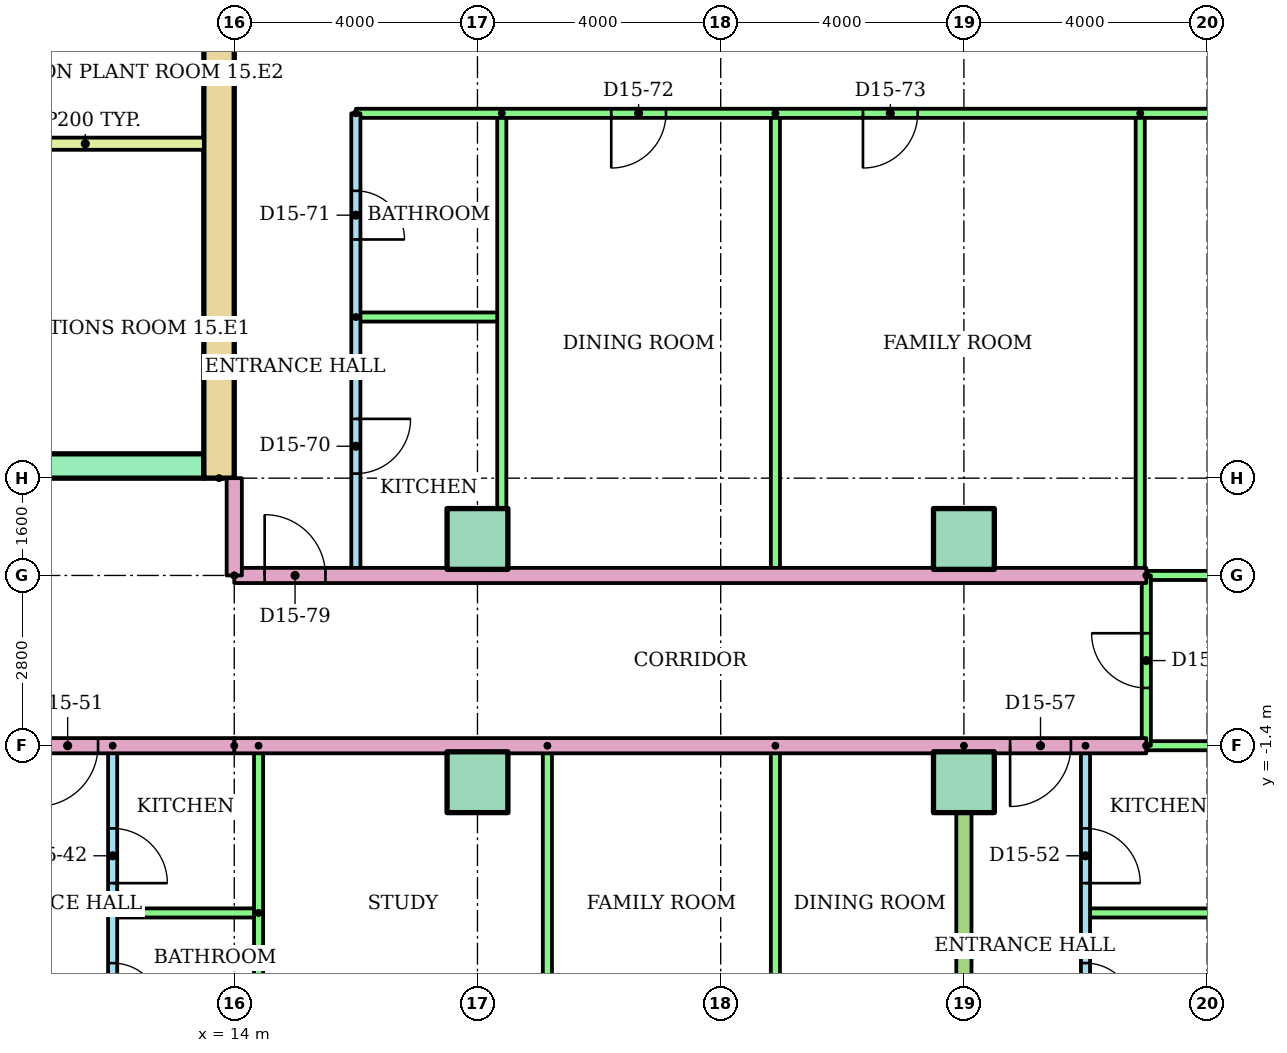
"""IFC4 building model, lengths in metres.
Left out: names, types, materials, properties, quantities, classifications, styles, units other than length and angle.
Written with IfcOpenShell. Run it as: python <this file> out.ifc"""

import sys

from ifc_helpers import new_model, si_unit, direction, frame, frame_2d, origin, origin_2d, place, context, subcontext, project, spatial, rectangle, extrude, element, fill, save


model = new_model("IFC4")
c1 = context("Model", 3, precision=1e-05, world=origin(), true_north=direction((0.0, 1.0)))
c2 = subcontext(c1, "Body", "Model", "MODEL_VIEW")
j1 = project(units=[si_unit("LENGTHUNIT", "METRE"), si_unit("PLANEANGLEUNIT", "RADIAN")], contexts=[c1])
p1 = place(None, origin())
s1 = spatial("IfcSite", under=j1, at=p1, CompositionType="ELEMENT")
p2 = place(p1, origin())
s2 = spatial("IfcBuilding", under=s1, at=p2, CompositionType="ELEMENT")
p3 = place(p2, frame((0.0, 0.0, 57.6)))
s3 = spatial("IfcBuildingStorey", under=s2, at=p3, CompositionType="ELEMENT", Elevation=57.6)
for number, where in (
    (1, (18.0, -2.0, 0.0)),
    (2, (26.0, -2.0, 0.0)),
    (3, (18.0, 2.0, 0.0)),
    (4, (26.0, 2.0, 0.0)),
):
    element("IfcColumn", number, at=place(p3, frame(where)), inside=s3, PredefinedType="COLUMN", context=c2, shape_type="SweptSolid", body=[
        extrude(rectangle(XDim=1.0, YDim=1.0, at=origin_2d()), origin(), (0.0, 0.0, 1.0), 3.2),
    ])
p4 = place(p3, frame((13.75, 3.0, 0.0), z_axis=(0.0, 0.0, 1.0), x_axis=(0.0, 1.0, 0.0)))
e5 = element("IfcWall", 5, at=p4, inside=s3, PredefinedType="SHEAR", context=c2, shape_type="SweptSolid", body=[
    extrude(rectangle(XDim=17.0, YDim=0.5, at=frame_2d((8.5, 0.0))), origin(), (0.0, 0.0, 1.0), 2.92),
])
p5 = place(p3, frame((-13.5, 3.2, 0.0)))
e6 = element("IfcWall", 6, at=p5, inside=s3, PredefinedType="SHEAR", context=c2, shape_type="SweptSolid", body=[
    extrude(rectangle(XDim=27.0, YDim=0.4, at=frame_2d((13.5, 0.0))), origin(), (0.0, 0.0, 1.0), 2.92),
])
p6 = place(p5, frame((6.861, 0.0, 0.0)))
e7 = element("IfcOpeningElement", 7, at=p6, cuts=e6, PredefinedType="OPENING", context=c2, shape_type="SweptSolid", body=[
    extrude(rectangle(XDim=1.1, YDim=2.1, at=frame_2d((0.55, 1.05))), frame((0.0, 0.21, 0.0), z_axis=(0.0, -1.0, 0.0), x_axis=(1.0, 0.0, 0.0)), (0.0, 0.0, 1.0), 0.42),
])
p7 = place(p5, frame((9.906, 0.0, 0.0)))
e8 = element("IfcOpeningElement", 8, at=p7, cuts=e6, PredefinedType="OPENING", context=c2, shape_type="SweptSolid", body=[
    extrude(rectangle(XDim=1.1, YDim=2.1, at=frame_2d((0.55, 1.05))), frame((0.0, 0.21, 0.0), z_axis=(0.0, -1.0, 0.0), x_axis=(1.0, 0.0, 0.0)), (0.0, 0.0, 1.0), 0.42),
])
p8 = place(p5, frame((15.994, 0.0, 0.0)))
e9 = element("IfcOpeningElement", 9, at=p8, cuts=e6, PredefinedType="OPENING", context=c2, shape_type="SweptSolid", body=[
    extrude(rectangle(XDim=1.1, YDim=2.1, at=frame_2d((0.55, 1.05))), frame((0.0, 0.21, 0.0), z_axis=(0.0, -1.0, 0.0), x_axis=(1.0, 0.0, 0.0)), (0.0, 0.0, 1.0), 0.42),
])
p9 = place(p5, frame((19.039, 0.0, 0.0)))
e10 = element("IfcOpeningElement", 10, at=p9, cuts=e6, PredefinedType="OPENING", context=c2, shape_type="SweptSolid", body=[
    extrude(rectangle(XDim=1.1, YDim=2.1, at=frame_2d((0.55, 1.05))), frame((0.0, 0.21, 0.0), z_axis=(0.0, -1.0, 0.0), x_axis=(1.0, 0.0, 0.0)), (0.0, 0.0, 1.0), 0.42),
])
p10 = place(p5, frame((12.6, 0.0, 0.0)))
e11 = element("IfcOpeningElement", 11, at=p10, cuts=e6, PredefinedType="OPENING", context=c2, shape_type="SweptSolid", body=[
    extrude(rectangle(XDim=1.8, YDim=2.1, at=frame_2d((0.9, 1.05))), frame((0.0, 0.21, 0.0), z_axis=(0.0, -1.0, 0.0), x_axis=(1.0, 0.0, 0.0)), (0.0, 0.0, 1.0), 0.42),
])
p11 = place(p3, frame((9.6, 8.5, 0.0)))
e12 = element("IfcWall", 12, at=p11, inside=s3, PredefinedType="PARTITIONING", context=c2, shape_type="SweptSolid", body=[
    extrude(rectangle(XDim=3.9, YDim=0.2, at=frame_2d((1.95, 0.0))), origin(), (0.0, 0.0, 1.0), 2.92),
])
p12 = place(p3, frame((12.0, -1.4, 0.0), z_axis=(0.0, 0.0, 1.0), x_axis=(0.0, -1.0, 0.0)))
e13 = element("IfcWall", 13, at=p12, inside=s3, PredefinedType="PARTITIONING", context=c2, shape_type="SweptSolid", body=[
    extrude(rectangle(XDim=5.2, YDim=0.15, at=frame_2d((2.6, 0.0))), origin(), (0.0, 0.0, 1.0), 2.4),
])
p13 = place(p12, frame((1.36, 0.0, 0.0)))
e14 = element("IfcOpeningElement", 14, at=p13, cuts=e13, PredefinedType="OPENING", context=c2, shape_type="SweptSolid", body=[
    extrude(rectangle(XDim=0.9, YDim=2.1, at=frame_2d((0.45, 1.05))), frame((0.0, 0.085, 0.0), z_axis=(0.0, -1.0, 0.0), x_axis=(1.0, 0.0, 0.0)), (0.0, 0.0, 1.0), 0.17),
])
p14 = place(p12, frame((3.575, 0.0, 0.0)))
e15 = element("IfcOpeningElement", 15, at=p14, cuts=e13, PredefinedType="OPENING", context=c2, shape_type="SweptSolid", body=[
    extrude(rectangle(XDim=0.8, YDim=2.1, at=frame_2d((0.4, 1.05))), frame((0.0, 0.085, 0.0), z_axis=(0.0, -1.0, 0.0), x_axis=(1.0, 0.0, 0.0)), (0.0, 0.0, 1.0), 0.17),
])
p15 = place(p3, frame((14.4, -4.15, 0.0), z_axis=(0.0, 0.0, 1.0), x_axis=(-1.0, 0.0, 0.0)))
e16 = element("IfcWall", 16, at=p15, inside=s3, PredefinedType="PARTITIONING", context=c2, shape_type="SweptSolid", body=[
    extrude(rectangle(XDim=2.4, YDim=0.15, at=frame_2d((1.2, 0.0))), origin(), (0.0, 0.0, 1.0), 2.4),
])
for number, where, z_axis, x_axis in (
    (17, (14.4, -1.4, 0.0), (0.0, 0.0, 1.0), (0.0, -1.0, 0.0)),
    (18, (19.15, -1.4, 0.0), (0.0, 0.0, 1.0), (0.0, -1.0, 0.0)),
    (19, (22.9, -1.4, 0.0), (0.0, 0.0, 1.0), (0.0, -1.0, 0.0)),
):
    element("IfcWall", number, at=place(p3, frame(where, z_axis=z_axis, x_axis=x_axis)), inside=s3, PredefinedType="PARTITIONING", context=c2, shape_type="SweptSolid", body=[
        extrude(rectangle(XDim=5.2, YDim=0.15, at=frame_2d((2.6, 0.0))), origin(), (0.0, 0.0, 1.0), 2.4),
    ])
p16 = place(p3, frame((28.0, -1.4, 0.0), z_axis=(0.0, 0.0, 1.0), x_axis=(0.0, -1.0, 0.0)))
e20 = element("IfcWall", 20, at=p16, inside=s3, PredefinedType="PARTITIONING", context=c2, shape_type="SweptSolid", body=[
    extrude(rectangle(XDim=5.2, YDim=0.15, at=frame_2d((2.6, 0.0))), origin(), (0.0, 0.0, 1.0), 2.4),
])
p17 = place(p16, frame((1.36, 0.0, 0.0)))
e21 = element("IfcOpeningElement", 21, at=p17, cuts=e20, PredefinedType="OPENING", context=c2, shape_type="SweptSolid", body=[
    extrude(rectangle(XDim=0.9, YDim=2.1, at=frame_2d((0.45, 1.05))), frame((0.0, 0.085, 0.0), z_axis=(0.0, -1.0, 0.0), x_axis=(1.0, 0.0, 0.0)), (0.0, 0.0, 1.0), 0.17),
])
p18 = place(p16, frame((3.575, 0.0, 0.0)))
e22 = element("IfcOpeningElement", 22, at=p18, cuts=e20, PredefinedType="OPENING", context=c2, shape_type="SweptSolid", body=[
    extrude(rectangle(XDim=0.8, YDim=2.1, at=frame_2d((0.4, 1.05))), frame((0.0, 0.085, 0.0), z_axis=(0.0, -1.0, 0.0), x_axis=(1.0, 0.0, 0.0)), (0.0, 0.0, 1.0), 0.17),
])
p19 = place(p3, frame((30.4, -4.15, 0.0), z_axis=(0.0, 0.0, 1.0), x_axis=(-1.0, 0.0, 0.0)))
e23 = element("IfcWall", 23, at=p19, inside=s3, PredefinedType="PARTITIONING", context=c2, shape_type="SweptSolid", body=[
    extrude(rectangle(XDim=2.4, YDim=0.15, at=frame_2d((1.2, 0.0))), origin(), (0.0, 0.0, 1.0), 2.4),
])
p20 = place(p3, frame((26.0, -1.4, 0.0), z_axis=(0.0, 0.0, 1.0), x_axis=(0.0, -1.0, 0.0)))
e24 = element("IfcWall", 24, at=p20, inside=s3, PredefinedType="PARTITIONING", context=c2, shape_type="SweptSolid", body=[
    extrude(rectangle(XDim=14.71, YDim=0.25, at=frame_2d((7.355, 0.0))), origin(), (0.0, 0.0, 1.0), 2.4),
])
p21 = place(p3, frame((29.0, -1.4, 0.0), z_axis=(0.0, 0.0, 1.0), x_axis=(-1.0, 0.0, 0.0)))
e25 = element("IfcWall", 25, at=p21, inside=s3, PredefinedType="PARTITIONING", context=c2, shape_type="SweptSolid", body=[
    extrude(rectangle(XDim=15.0, YDim=0.25, at=frame_2d((7.5, 0.0))), origin(), (0.0, 0.0, 1.0), 2.4),
])
p22 = place(p21, frame((1.24, 0.0, 0.0)))
e26 = element("IfcOpeningElement", 26, at=p22, cuts=e25, PredefinedType="OPENING", context=c2, shape_type="SweptSolid", body=[
    extrude(rectangle(XDim=1.0, YDim=2.1, at=frame_2d((0.5, 1.05))), frame((0.0, 0.135, 0.0), z_axis=(0.0, -1.0, 0.0), x_axis=(1.0, 0.0, 0.0)), (0.0, 0.0, 1.0), 0.27),
])
p23 = place(p3, frame((36.52, -1.4, 0.0), z_axis=(0.0, 0.0, 1.0), x_axis=(-1.0, 0.0, 0.0)))
e27 = element("IfcWall", 27, at=p23, inside=s3, PredefinedType="PARTITIONING", context=c2, shape_type="SweptSolid", body=[
    extrude(rectangle(XDim=7.52, YDim=0.15, at=frame_2d((3.76, 0.0))), origin(), (0.0, 0.0, 1.0), 2.4),
])
p24 = place(p3, frame((16.0, 9.0, 0.0), z_axis=(0.0, 0.0, 1.0), x_axis=(0.0, -1.0, 0.0)))
e28 = element("IfcWall", 28, at=p24, inside=s3, PredefinedType="PARTITIONING", context=c2, shape_type="SweptSolid", body=[
    extrude(rectangle(XDim=7.6, YDim=0.15, at=frame_2d((3.8, 0.0))), origin(), (0.0, 0.0, 1.0), 2.4),
])
p25 = place(p24, frame((5.025, 0.0, 0.0)))
e29 = element("IfcOpeningElement", 29, at=p25, cuts=e28, PredefinedType="OPENING", context=c2, shape_type="SweptSolid", body=[
    extrude(rectangle(XDim=0.9, YDim=2.1, at=frame_2d((0.45, 1.05))), frame((0.0, 0.085, 0.0), z_axis=(0.0, -1.0, 0.0), x_axis=(1.0, 0.0, 0.0)), (0.0, 0.0, 1.0), 0.17),
])
p26 = place(p24, frame((1.275, 0.0, 0.0)))
e30 = element("IfcOpeningElement", 30, at=p26, cuts=e28, PredefinedType="OPENING", context=c2, shape_type="SweptSolid", body=[
    extrude(rectangle(XDim=0.8, YDim=2.1, at=frame_2d((0.4, 1.05))), frame((0.0, 0.085, 0.0), z_axis=(0.0, -1.0, 0.0), x_axis=(1.0, 0.0, 0.0)), (0.0, 0.0, 1.0), 0.17),
])
p27 = place(p3, frame((16.0, 5.65, 0.0)))
e31 = element("IfcWall", 31, at=p27, inside=s3, PredefinedType="PARTITIONING", context=c2, shape_type="SweptSolid", body=[
    extrude(rectangle(XDim=2.4, YDim=0.15, at=frame_2d((1.2, 0.0))), origin(), (0.0, 0.0, 1.0), 2.4),
])
for number, where, z_axis, x_axis in (
    (32, (18.4, 9.0, 0.0), (0.0, 0.0, 1.0), (0.0, -1.0, 0.0)),
    (33, (22.9, 9.0, 0.0), (0.0, 0.0, 1.0), (0.0, -1.0, 0.0)),
    (34, (28.9, 9.0, 0.0), (0.0, 0.0, 1.0), (0.0, -1.0, 0.0)),
):
    element("IfcWall", number, at=place(p3, frame(where, z_axis=z_axis, x_axis=x_axis)), inside=s3, PredefinedType="PARTITIONING", context=c2, shape_type="SweptSolid", body=[
        extrude(rectangle(XDim=7.6, YDim=0.15, at=frame_2d((3.8, 0.0))), origin(), (0.0, 0.0, 1.0), 2.4),
    ])
p28 = place(p3, frame((36.51, 9.0, 0.0), z_axis=(0.0, 0.0, 1.0), x_axis=(-1.0, 0.0, 0.0)))
e35 = element("IfcWall", 35, at=p28, inside=s3, PredefinedType="PARTITIONING", context=c2, shape_type="SweptSolid", body=[
    extrude(rectangle(XDim=20.51, YDim=0.15, at=frame_2d((10.255, 0.0))), origin(), (0.0, 0.0, 1.0), 2.4),
])
p29 = place(p28, frame((15.41, 0.0, 0.0)))
e36 = element("IfcOpeningElement", 36, at=p29, cuts=e35, PredefinedType="OPENING", context=c2, shape_type="SweptSolid", body=[
    extrude(rectangle(XDim=0.9, YDim=2.1, at=frame_2d((0.45, 1.05))), frame((0.0, 0.085, 0.0), z_axis=(0.0, -1.0, 0.0), x_axis=(1.0, 0.0, 0.0)), (0.0, 0.0, 1.0), 0.17),
])
p30 = place(p28, frame((11.27, 0.0, 0.0)))
e37 = element("IfcOpeningElement", 37, at=p30, cuts=e35, PredefinedType="OPENING", context=c2, shape_type="SweptSolid", body=[
    extrude(rectangle(XDim=0.9, YDim=2.1, at=frame_2d((0.45, 1.05))), frame((0.0, 0.085, 0.0), z_axis=(0.0, -1.0, 0.0), x_axis=(1.0, 0.0, 0.0)), (0.0, 0.0, 1.0), 0.17),
])
p31 = place(p28, frame((3.46, 0.0, 0.0)))
e38 = element("IfcOpeningElement", 38, at=p31, cuts=e35, PredefinedType="OPENING", context=c2, shape_type="SweptSolid", body=[
    extrude(rectangle(XDim=0.9, YDim=2.1, at=frame_2d((0.45, 1.05))), frame((0.0, 0.085, 0.0), z_axis=(0.0, -1.0, 0.0), x_axis=(1.0, 0.0, 0.0)), (0.0, 0.0, 1.0), 0.17),
])
p32 = place(p3, frame((14.0, 1.4, 0.0)))
e39 = element("IfcWall", 39, at=p32, inside=s3, PredefinedType="PARTITIONING", context=c2, shape_type="SweptSolid", body=[
    extrude(rectangle(XDim=15.0, YDim=0.25, at=frame_2d((7.5, 0.0))), origin(), (0.0, 0.0, 1.0), 2.4),
])
p33 = place(p32, frame((0.5, 0.0, 0.0)))
e40 = element("IfcOpeningElement", 40, at=p33, cuts=e39, PredefinedType="OPENING", context=c2, shape_type="SweptSolid", body=[
    extrude(rectangle(XDim=1.0, YDim=2.1, at=frame_2d((0.5, 1.05))), frame((0.0, 0.135, 0.0), z_axis=(0.0, -1.0, 0.0), x_axis=(1.0, 0.0, 0.0)), (0.0, 0.0, 1.0), 0.27),
])
p34 = place(p3, frame((29.0, 1.4, 0.0)))
e41 = element("IfcWall", 41, at=p34, inside=s3, PredefinedType="PARTITIONING", context=c2, shape_type="SweptSolid", body=[
    extrude(rectangle(XDim=7.52, YDim=0.15, at=frame_2d((3.76, 0.0))), origin(), (0.0, 0.0, 1.0), 2.4),
])
p35 = place(p3, frame((29.0, -1.4, 0.0), z_axis=(0.0, 0.0, 1.0), x_axis=(0.0, 1.0, 0.0)))
e42 = element("IfcWall", 42, at=p35, inside=s3, PredefinedType="PARTITIONING", context=c2, shape_type="SweptSolid", body=[
    extrude(rectangle(XDim=2.8, YDim=0.15, at=frame_2d((1.4, 0.0))), origin(), (0.0, 0.0, 1.0), 2.4),
])
p36 = place(p35, frame((0.95, 0.0, 0.0)))
e43 = element("IfcOpeningElement", 43, at=p36, cuts=e42, PredefinedType="OPENING", context=c2, shape_type="SweptSolid", body=[
    extrude(rectangle(XDim=0.9, YDim=2.1, at=frame_2d((0.45, 1.05))), frame((0.0, 0.085, 0.0), z_axis=(0.0, -1.0, 0.0), x_axis=(1.0, 0.0, 0.0)), (0.0, 0.0, 1.0), 0.17),
])
p37 = place(p3, frame((14.0, -1.4, 0.0), z_axis=(0.0, 0.0, 1.0), x_axis=(-1.0, 0.0, 0.0)))
e44 = element("IfcWall", 44, at=p37, inside=s3, PredefinedType="PARTITIONING", context=c2, shape_type="SweptSolid", body=[
    extrude(rectangle(XDim=28.0, YDim=0.25, at=frame_2d((14.0, 0.0))), origin(), (0.0, 0.0, 1.0), 2.4),
])
p38 = place(p37, frame((20.76, 0.0, 0.0)))
e45 = element("IfcOpeningElement", 45, at=p38, cuts=e44, PredefinedType="OPENING", context=c2, shape_type="SweptSolid", body=[
    extrude(rectangle(XDim=1.0, YDim=2.1, at=frame_2d((0.5, 1.05))), frame((0.0, 0.135, 0.0), z_axis=(0.0, -1.0, 0.0), x_axis=(1.0, 0.0, 0.0)), (0.0, 0.0, 1.0), 0.27),
])
p39 = place(p37, frame((18.24, 0.0, 0.0)))
e46 = element("IfcOpeningElement", 46, at=p39, cuts=e44, PredefinedType="OPENING", context=c2, shape_type="SweptSolid", body=[
    extrude(rectangle(XDim=1.0, YDim=2.1, at=frame_2d((0.5, 1.05))), frame((0.0, 0.135, 0.0), z_axis=(0.0, -1.0, 0.0), x_axis=(1.0, 0.0, 0.0)), (0.0, 0.0, 1.0), 0.27),
])
p40 = place(p37, frame((2.24, 0.0, 0.0)))
e47 = element("IfcOpeningElement", 47, at=p40, cuts=e44, PredefinedType="OPENING", context=c2, shape_type="SweptSolid", body=[
    extrude(rectangle(XDim=1.0, YDim=2.1, at=frame_2d((0.5, 1.05))), frame((0.0, 0.135, 0.0), z_axis=(0.0, -1.0, 0.0), x_axis=(1.0, 0.0, 0.0)), (0.0, 0.0, 1.0), 0.27),
])
p41 = place(p3, frame((14.0, 1.4, 0.0), z_axis=(0.0, 0.0, 1.0), x_axis=(0.0, 1.0, 0.0)))
e48 = element("IfcWall", 48, at=p41, inside=s3, PredefinedType="PARTITIONING", context=c2, shape_type="SweptSolid", body=[
    extrude(rectangle(XDim=1.6, YDim=0.25, at=frame_2d((0.8, 0.0))), origin(), (0.0, 0.0, 1.0), 2.4),
])
p42 = place(p13, origin())
e49 = element("IfcDoor", 49, at=p42, inside=s3, OperationType="SINGLE_SWING_RIGHT", PredefinedType="DOOR", context=c2, shape_type="SweptSolid", body=[
    extrude(rectangle(XDim=0.9, YDim=2.1, at=frame_2d((0.45, 1.05))), frame((0.0, 0.025, 0.0), z_axis=(0.0, -1.0, 0.0), x_axis=(1.0, 0.0, 0.0)), (0.0, 0.0, 1.0), 0.05),
])
fill(e14, e49)
p43 = place(p14, origin())
e50 = element("IfcDoor", 50, at=p43, inside=s3, OperationType="SINGLE_SWING_RIGHT", PredefinedType="DOOR", context=c2, shape_type="SweptSolid", body=[
    extrude(rectangle(XDim=0.8, YDim=2.1, at=frame_2d((0.4, 1.05))), frame((0.0, 0.025, 0.0), z_axis=(0.0, -1.0, 0.0), x_axis=(1.0, 0.0, 0.0)), (0.0, 0.0, 1.0), 0.05),
])
fill(e15, e50)
p44 = place(p40, origin())
e51 = element("IfcDoor", 51, at=p44, inside=s3, OperationType="SINGLE_SWING_RIGHT", PredefinedType="DOOR", context=c2, shape_type="SweptSolid", body=[
    extrude(rectangle(XDim=1.0, YDim=2.1, at=frame_2d((0.5, 1.05))), frame((0.0, 0.025, 0.0), z_axis=(0.0, -1.0, 0.0), x_axis=(1.0, 0.0, 0.0)), (0.0, 0.0, 1.0), 0.05),
])
fill(e47, e51)
p45 = place(p17, origin())
e52 = element("IfcDoor", 52, at=p45, inside=s3, OperationType="SINGLE_SWING_RIGHT", PredefinedType="DOOR", context=c2, shape_type="SweptSolid", body=[
    extrude(rectangle(XDim=0.9, YDim=2.1, at=frame_2d((0.45, 1.05))), frame((0.0, 0.025, 0.0), z_axis=(0.0, -1.0, 0.0), x_axis=(1.0, 0.0, 0.0)), (0.0, 0.0, 1.0), 0.05),
])
fill(e21, e52)
p46 = place(p18, origin())
e53 = element("IfcDoor", 53, at=p46, inside=s3, OperationType="SINGLE_SWING_RIGHT", PredefinedType="DOOR", context=c2, shape_type="SweptSolid", body=[
    extrude(rectangle(XDim=0.8, YDim=2.1, at=frame_2d((0.4, 1.05))), frame((0.0, 0.025, 0.0), z_axis=(0.0, -1.0, 0.0), x_axis=(1.0, 0.0, 0.0)), (0.0, 0.0, 1.0), 0.05),
])
fill(e22, e53)
p47 = place(p22, origin())
e54 = element("IfcDoor", 54, at=p47, inside=s3, OperationType="SINGLE_SWING_RIGHT", PredefinedType="DOOR", context=c2, shape_type="SweptSolid", body=[
    extrude(rectangle(XDim=1.0, YDim=2.1, at=frame_2d((0.5, 1.05))), frame((0.0, 0.025, 0.0), z_axis=(0.0, -1.0, 0.0), x_axis=(1.0, 0.0, 0.0)), (0.0, 0.0, 1.0), 0.05),
])
fill(e26, e54)
p48 = place(p25, origin())
e55 = element("IfcDoor", 55, at=p48, inside=s3, OperationType="SINGLE_SWING_LEFT", PredefinedType="DOOR", context=c2, shape_type="SweptSolid", body=[
    extrude(rectangle(XDim=0.9, YDim=2.1, at=frame_2d((0.45, 1.05))), frame((0.0, 0.025, 0.0), z_axis=(0.0, -1.0, 0.0), x_axis=(1.0, 0.0, 0.0)), (0.0, 0.0, 1.0), 0.05),
])
fill(e29, e55)
p49 = place(p26, origin())
e56 = element("IfcDoor", 56, at=p49, inside=s3, OperationType="SINGLE_SWING_RIGHT", PredefinedType="DOOR", context=c2, shape_type="SweptSolid", body=[
    extrude(rectangle(XDim=0.8, YDim=2.1, at=frame_2d((0.4, 1.05))), frame((0.0, 0.025, 0.0), z_axis=(0.0, -1.0, 0.0), x_axis=(1.0, 0.0, 0.0)), (0.0, 0.0, 1.0), 0.05),
])
fill(e30, e56)
p50 = place(p29, origin())
e57 = element("IfcDoor", 57, at=p50, inside=s3, OperationType="SINGLE_SWING_RIGHT", PredefinedType="DOOR", context=c2, shape_type="SweptSolid", body=[
    extrude(rectangle(XDim=0.9, YDim=2.1, at=frame_2d((0.45, 1.05))), frame((0.0, 0.025, 0.0), z_axis=(0.0, -1.0, 0.0), x_axis=(1.0, 0.0, 0.0)), (0.0, 0.0, 1.0), 0.05),
])
fill(e36, e57)
p51 = place(p30, origin())
e58 = element("IfcDoor", 58, at=p51, inside=s3, OperationType="SINGLE_SWING_RIGHT", PredefinedType="DOOR", context=c2, shape_type="SweptSolid", body=[
    extrude(rectangle(XDim=0.9, YDim=2.1, at=frame_2d((0.45, 1.05))), frame((0.0, 0.025, 0.0), z_axis=(0.0, -1.0, 0.0), x_axis=(1.0, 0.0, 0.0)), (0.0, 0.0, 1.0), 0.05),
])
fill(e37, e58)
p52 = place(p33, origin())
e59 = element("IfcDoor", 59, at=p52, inside=s3, OperationType="SINGLE_SWING_LEFT", PredefinedType="DOOR", context=c2, shape_type="SweptSolid", body=[
    extrude(rectangle(XDim=1.0, YDim=2.1, at=frame_2d((0.5, 1.05))), frame((0.0, 0.025, 0.0), z_axis=(0.0, -1.0, 0.0), x_axis=(1.0, 0.0, 0.0)), (0.0, 0.0, 1.0), 0.05),
])
fill(e40, e59)
p53 = place(p36, origin())
e60 = element("IfcDoor", 60, at=p53, inside=s3, OperationType="SINGLE_SWING_RIGHT", PredefinedType="DOOR", context=c2, shape_type="SweptSolid", body=[
    extrude(rectangle(XDim=0.9, YDim=2.1, at=frame_2d((0.45, 1.05))), frame((0.0, 0.025, 0.0), z_axis=(0.0, -1.0, 0.0), x_axis=(1.0, 0.0, 0.0)), (0.0, 0.0, 1.0), 0.05),
])
fill(e43, e60)
save(model, sys.argv[1])
